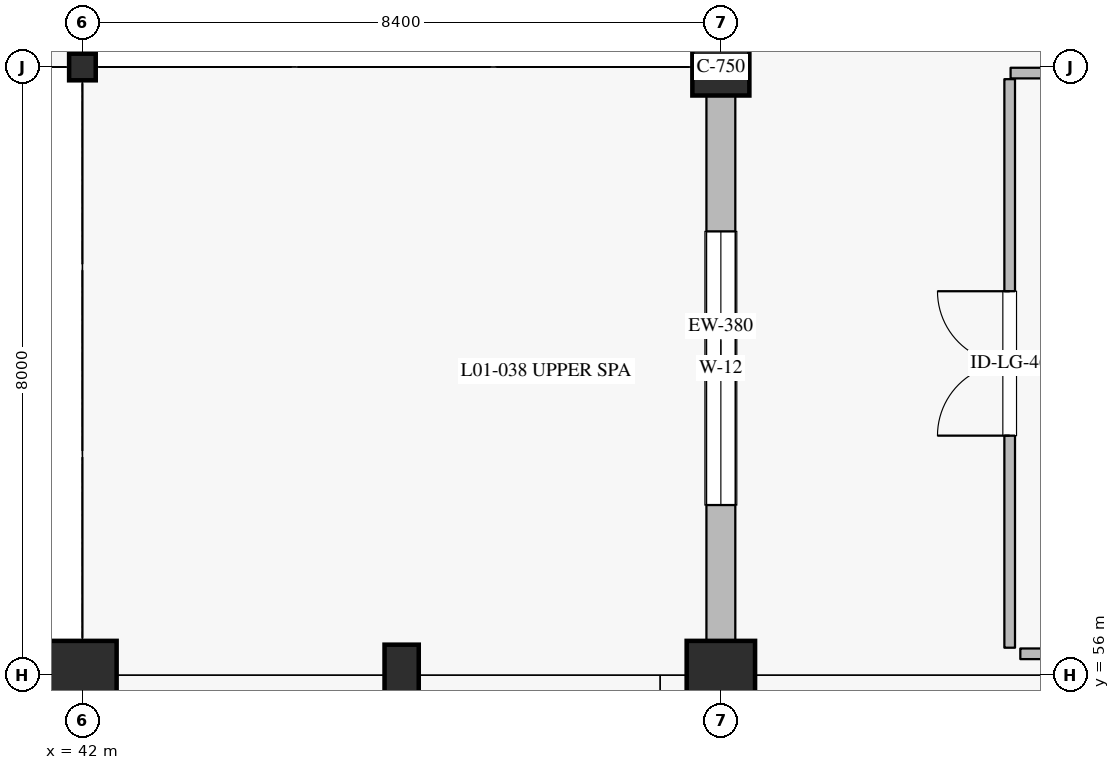
"""IFC4 building model, lengths in metres.
Left out: names, types, materials, properties, quantities, classifications, styles, units other than length and angle.
Written with IfcOpenShell. Run it as: python <this file> out.ifc"""

import sys

from ifc_helpers import new_model, si_unit, direction, frame, frame_2d, origin, origin_2d, place, context, subcontext, project, spatial, rectangle, hollow_rectangle, extrude, element, fill, save


model = new_model("IFC4")
c1 = context("Model", 3, precision=1e-05, world=origin(), true_north=direction((0.0, 1.0)))
c2 = subcontext(c1, "Body", "Model", "MODEL_VIEW")
j1 = project(units=[si_unit("LENGTHUNIT", "METRE"), si_unit("PLANEANGLEUNIT", "RADIAN")], contexts=[c1])
p1 = place(None, origin())
s1 = spatial("IfcSite", under=j1, at=p1, CompositionType="ELEMENT")
p2 = place(p1, origin())
s2 = spatial("IfcBuilding", under=s1, at=p2, CompositionType="ELEMENT")
p3 = place(p2, frame((0.0, 0.0, 6.0)))
s3 = spatial("IfcBuildingStorey", under=s2, at=p3, CompositionType="ELEMENT", Elevation=6.0)
p4 = place(p3, frame((42.0, 56.0, 0.0), z_axis=(0.0, 0.0, 1.0), x_axis=(1.0, 0.0, 0.0)))
e1 = element("IfcColumn", 1, at=p4, inside=s3, PredefinedType="COLUMN", context=c2, shape_type="SweptSolid", body=[
    extrude(rectangle(XDim=0.9, YDim=0.9, at=origin_2d()), origin(), (0.0, 0.0, 1.0), 5.4),
])
p5 = place(p3, frame((42.0, 64.0, 0.0), z_axis=(0.0, 0.0, 1.0), x_axis=(1.0, 0.0, 0.0)))
e2 = element("IfcColumn", 2, at=p5, inside=s3, PredefinedType="COLUMN", context=c2, shape_type="SweptSolid", body=[
    extrude(hollow_rectangle(XDim=0.35, YDim=0.35, WallThickness=0.016, at=origin_2d()), origin(), (0.0, 0.0, 1.0), 5.4),
])
p6 = place(p3, frame((46.2, 56.0, 0.0), z_axis=(0.0, 0.0, 1.0), x_axis=(1.0, 0.0, 0.0)))
e3 = element("IfcColumn", 3, at=p6, inside=s3, PredefinedType="PILASTER", context=c2, shape_type="SweptSolid", body=[
    extrude(rectangle(XDim=0.45, YDim=0.8, at=origin_2d()), origin(), (0.0, 0.0, 1.0), 5.4),
])
p7 = place(p3, frame((50.4, 56.0, 0.0), z_axis=(0.0, 0.0, 1.0), x_axis=(1.0, 0.0, 0.0)))
e4 = element("IfcColumn", 4, at=p7, inside=s3, PredefinedType="COLUMN", context=c2, shape_type="SweptSolid", body=[
    extrude(rectangle(XDim=0.9, YDim=0.9, at=origin_2d()), origin(), (0.0, 0.0, 1.0), 5.4),
])
p8 = place(p3, frame((50.4, 64.0, 0.0), z_axis=(0.0, 0.0, 1.0), x_axis=(1.0, 0.0, 0.0)))
e5 = element("IfcColumn", 5, at=p8, inside=s3, PredefinedType="COLUMN", context=c2, shape_type="SweptSolid", body=[
    extrude(rectangle(XDim=0.75, YDim=0.75, at=origin_2d()), origin(), (0.0, 0.0, 1.0), 5.4),
])
p9 = place(p3, frame((50.4, 56.45, 0.0), z_axis=(0.0, 0.0, 1.0), x_axis=(0.0, 1.0, 0.0)))
e6 = element("IfcWall", 6, at=p9, inside=s3, PredefinedType="SOLIDWALL", context=c2, shape_type="SweptSolid", body=[
    extrude(rectangle(XDim=7.175, YDim=0.38, at=frame_2d((3.587, 0.0))), origin(), (0.0, 0.0, 1.0), 4.67),
])
p10 = place(p9, frame((1.787, 0.0, 0.9)))
e7 = element("IfcOpeningElement", 7, at=p10, cuts=e6, PredefinedType="OPENING", context=c2, shape_type="SweptSolid", body=[
    extrude(rectangle(XDim=3.6, YDim=2.5, at=frame_2d((1.8, 1.25))), frame((0.0, 0.2, 0.0), z_axis=(0.0, -1.0, 0.0), x_axis=(1.0, 0.0, 0.0)), (0.0, 0.0, 1.0), 0.4),
])
p11 = place(p3, frame((54.2, 56.36, 0.0), z_axis=(0.0, 0.0, 1.0), x_axis=(0.0, 1.0, 0.0)))
e8 = element("IfcWall", 8, at=p11, inside=s3, PredefinedType="PARTITIONING", context=c2, shape_type="SweptSolid", body=[
    extrude(rectangle(XDim=7.48, YDim=0.14, at=frame_2d((3.74, 0.0))), origin(), (0.0, 0.0, 1.0), 5.045),
])
p12 = place(p11, frame((2.79, 0.0, 0.0)))
e9 = element("IfcOpeningElement", 9, at=p12, cuts=e8, PredefinedType="OPENING", context=c2, shape_type="SweptSolid", body=[
    extrude(rectangle(XDim=1.9, YDim=2.4, at=frame_2d((0.95, 1.2))), frame((0.0, 0.08, 0.0), z_axis=(0.0, -1.0, 0.0), x_axis=(1.0, 0.0, 0.0)), (0.0, 0.0, 1.0), 0.16),
])
p13 = place(p3, frame((54.34, 56.28, 0.0), z_axis=(0.0, 0.0, 1.0), x_axis=(1.0, 0.0, 0.0)))
e10 = element("IfcWall", 10, at=p13, inside=s3, PredefinedType="PARTITIONING", context=c2, shape_type="SweptSolid", body=[
    extrude(rectangle(XDim=11.61, YDim=0.14, at=frame_2d((5.805, 0.0))), origin(), (0.0, 0.0, 1.0), 5.045),
])
p14 = place(p3, frame((54.212, 63.92, 0.0), z_axis=(0.0, 0.0, 1.0), x_axis=(1.0, 0.0, 0.0)))
e11 = element("IfcWall", 11, at=p14, inside=s3, PredefinedType="PARTITIONING", context=c2, shape_type="SweptSolid", body=[
    extrude(rectangle(XDim=4.213, YDim=0.14, at=frame_2d((2.106, 0.0))), origin(), (0.0, 0.0, 1.0), 5.045),
])
p15 = place(p10, origin())
e12 = element("IfcWindow", 12, at=p15, inside=s3, PartitioningType="DOUBLE_PANEL_VERTICAL", PredefinedType="WINDOW", context=c2, shape_type="SweptSolid", body=[
    extrude(rectangle(XDim=3.6, YDim=2.5, at=frame_2d((1.8, 1.25))), frame((0.0, 0.03, 0.0), z_axis=(0.0, -1.0, 0.0), x_axis=(1.0, 0.0, 0.0)), (0.0, 0.0, 1.0), 0.06),
])
fill(e7, e12)
p16 = place(p12, origin())
e13 = element("IfcDoor", 13, at=p16, inside=s3, OperationType="DOUBLE_DOOR_SINGLE_SWING", PredefinedType="DOOR", context=c2, shape_type="SweptSolid", body=[
    extrude(rectangle(XDim=1.9, YDim=2.4, at=frame_2d((0.95, 1.2))), frame((0.0, 0.025, 0.0), z_axis=(0.0, -1.0, 0.0), x_axis=(1.0, 0.0, 0.0)), (0.0, 0.0, 1.0), 0.05),
])
fill(e9, e13)
save(model, sys.argv[1])
